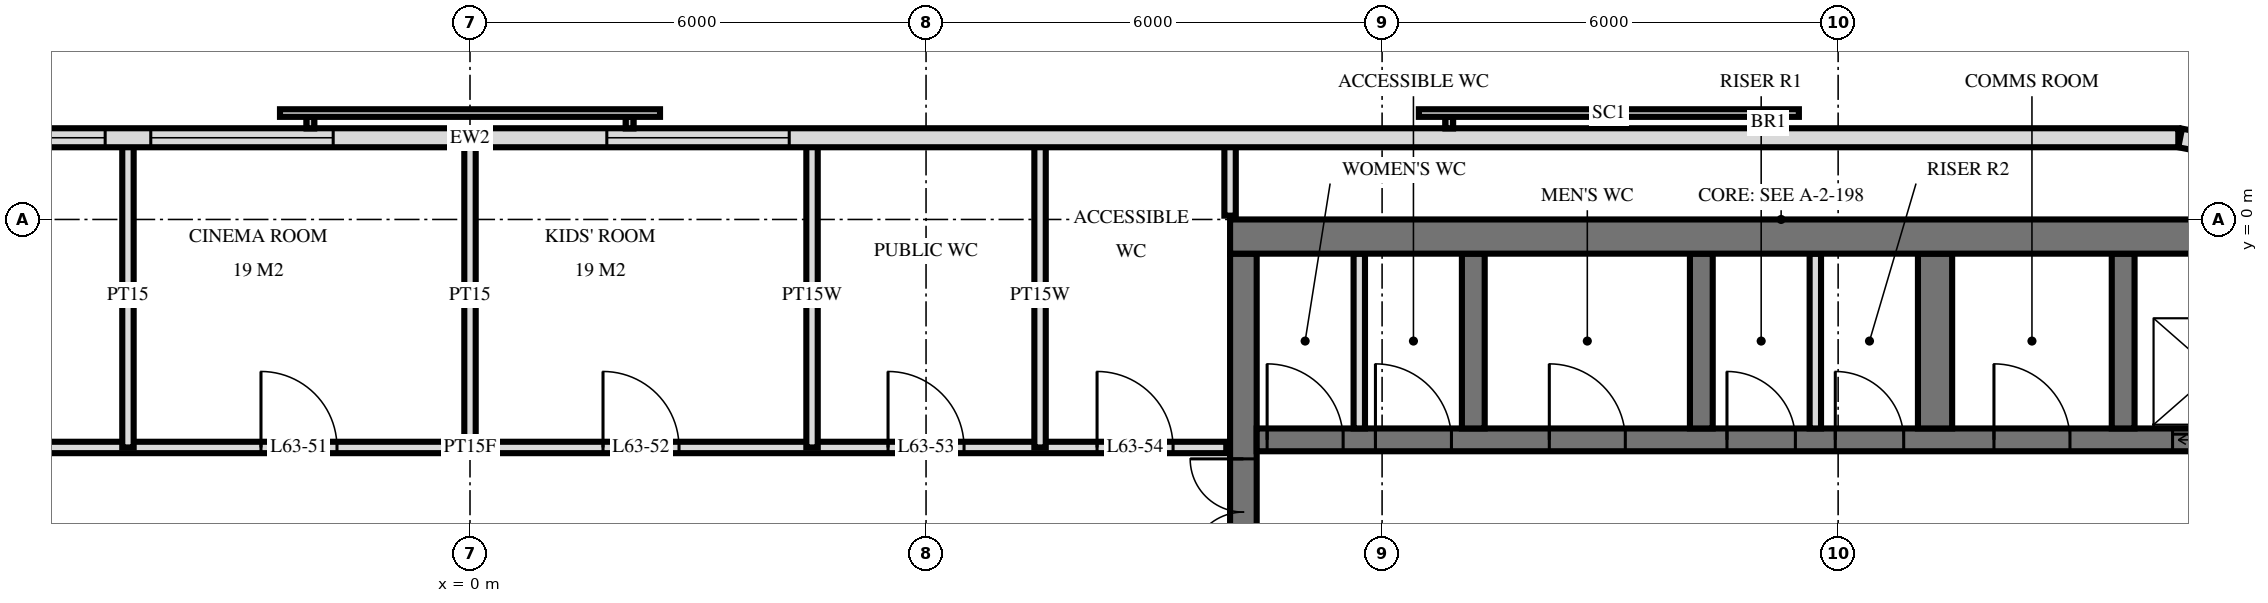
"""IFC4 building model, lengths in metres.
Left out: names, types, materials, properties, quantities, classifications, styles, units other than length and angle.
Written with IfcOpenShell. Run it as: python <this file> out.ifc"""

import sys

from ifc_helpers import new_model, si_unit, direction, frame, frame_2d, origin, place, context, subcontext, project, spatial, rectangle, extrude, element, fill, save


model = new_model("IFC4")
c1 = context("Model", 3, precision=1e-05, world=origin(), true_north=direction((0.0, 1.0)))
c2 = subcontext(c1, "Body", "Model", "MODEL_VIEW")
j1 = project(units=[si_unit("LENGTHUNIT", "METRE"), si_unit("PLANEANGLEUNIT", "RADIAN")], contexts=[c1])
p1 = place(None, origin())
s1 = spatial("IfcSite", under=j1, at=p1, CompositionType="ELEMENT")
p2 = place(p1, origin())
s2 = spatial("IfcBuilding", under=s1, at=p2, CompositionType="ELEMENT")
p3 = place(p2, frame((0.0, 0.0, 239.6)))
s3 = spatial("IfcBuildingStorey", under=s2, at=p3, CompositionType="ELEMENT", Elevation=239.6)
p4 = place(p3, frame((10.0, -0.225, 0.0), z_axis=(0.0, 0.0, 1.0), x_axis=(1.0, 0.0, 0.0)))
e1 = element("IfcWall", 1, at=p4, inside=s3, PredefinedType="SHEAR", context=c2, shape_type="SweptSolid", body=[
    extrude(rectangle(XDim=14.5, YDim=0.45, at=frame_2d((7.25, 0.0))), origin(), (0.0, 0.0, 1.0), 3.5),
])
p5 = place(p3, frame((10.175, -14.55, 0.0), z_axis=(0.0, 0.0, 1.0), x_axis=(0.0, 1.0, 0.0)))
e2 = element("IfcWall", 2, at=p5, inside=s3, PredefinedType="SHEAR", context=c2, shape_type="SweptSolid", body=[
    extrude(rectangle(XDim=14.1, YDim=0.35, at=frame_2d((7.05, 0.0))), origin(), (0.0, 0.0, 1.0), 3.5),
])
p6 = place(p5, frame((8.4, 0.0, 0.0)))
e3 = element("IfcOpeningElement", 3, at=p6, cuts=e2, PredefinedType="OPENING", context=c2, shape_type="SweptSolid", body=[
    extrude(rectangle(XDim=1.4, YDim=2.4, at=frame_2d((0.7, 1.2))), frame((0.0, 0.185, 0.0), z_axis=(0.0, -1.0, 0.0), x_axis=(1.0, 0.0, 0.0)), (0.0, 0.0, 1.0), 0.37),
])
p7 = place(p5, frame((10.0, 0.0, 0.0)))
e4 = element("IfcOpeningElement", 4, at=p7, cuts=e2, PredefinedType="OPENING", context=c2, shape_type="SweptSolid", body=[
    extrude(rectangle(XDim=1.4, YDim=2.4, at=frame_2d((0.7, 1.2))), frame((0.0, 0.185, 0.0), z_axis=(0.0, -1.0, 0.0), x_axis=(1.0, 0.0, 0.0)), (0.0, 0.0, 1.0), 0.37),
])
p8 = place(p5, frame((4.0, 0.0, 0.0)))
e5 = element("IfcOpeningElement", 5, at=p8, cuts=e2, PredefinedType="OPENING", context=c2, shape_type="SweptSolid", body=[
    extrude(rectangle(XDim=1.2, YDim=2.1, at=frame_2d((0.6, 1.05))), frame((0.0, 0.185, 0.0), z_axis=(0.0, -1.0, 0.0), x_axis=(1.0, 0.0, 0.0)), (0.0, 0.0, 1.0), 0.37),
])
p9 = place(p3, frame((10.35, -2.9, 0.0), z_axis=(0.0, 0.0, 1.0), x_axis=(1.0, 0.0, 0.0)))
e6 = element("IfcWall", 6, at=p9, inside=s3, PredefinedType="SHEAR", context=c2, shape_type="SweptSolid", body=[
    extrude(rectangle(XDim=13.7, YDim=0.3, at=frame_2d((6.85, 0.0))), origin(), (0.0, 0.0, 1.0), 3.5),
])
p10 = place(p9, frame((12.05, 0.0, 0.0)))
e7 = element("IfcOpeningElement", 7, at=p10, cuts=e6, PredefinedType="OPENING", context=c2, shape_type="SweptSolid", body=[
    extrude(rectangle(XDim=1.1, YDim=2.1, at=frame_2d((0.55, 1.05))), frame((0.0, 0.16, 0.0), z_axis=(0.0, -1.0, 0.0), x_axis=(1.0, 0.0, 0.0)), (0.0, 0.0, 1.0), 0.32),
])
p11 = place(p9, frame((6.188, 0.0, 0.0)))
e8 = element("IfcOpeningElement", 8, at=p11, cuts=e6, PredefinedType="OPENING", context=c2, shape_type="SweptSolid", body=[
    extrude(rectangle(XDim=0.9, YDim=2.1, at=frame_2d((0.45, 1.05))), frame((0.0, 0.16, 0.0), z_axis=(0.0, -1.0, 0.0), x_axis=(1.0, 0.0, 0.0)), (0.0, 0.0, 1.0), 0.32),
])
p12 = place(p9, frame((7.613, 0.0, 0.0)))
e9 = element("IfcOpeningElement", 9, at=p12, cuts=e6, PredefinedType="OPENING", context=c2, shape_type="SweptSolid", body=[
    extrude(rectangle(XDim=0.9, YDim=2.1, at=frame_2d((0.45, 1.05))), frame((0.0, 0.16, 0.0), z_axis=(0.0, -1.0, 0.0), x_axis=(1.0, 0.0, 0.0)), (0.0, 0.0, 1.0), 0.32),
])
p13 = place(p9, frame((0.137, 0.0, 0.0)))
e10 = element("IfcOpeningElement", 10, at=p13, cuts=e6, PredefinedType="OPENING", context=c2, shape_type="SweptSolid", body=[
    extrude(rectangle(XDim=1.0, YDim=2.1, at=frame_2d((0.5, 1.05))), frame((0.0, 0.16, 0.0), z_axis=(0.0, -1.0, 0.0), x_axis=(1.0, 0.0, 0.0)), (0.0, 0.0, 1.0), 0.32),
])
p14 = place(p9, frame((1.562, 0.0, 0.0)))
e11 = element("IfcOpeningElement", 11, at=p14, cuts=e6, PredefinedType="OPENING", context=c2, shape_type="SweptSolid", body=[
    extrude(rectangle(XDim=1.0, YDim=2.1, at=frame_2d((0.5, 1.05))), frame((0.0, 0.16, 0.0), z_axis=(0.0, -1.0, 0.0), x_axis=(1.0, 0.0, 0.0)), (0.0, 0.0, 1.0), 0.32),
])
p15 = place(p9, frame((3.85, 0.0, 0.0)))
e12 = element("IfcOpeningElement", 12, at=p15, cuts=e6, PredefinedType="OPENING", context=c2, shape_type="SweptSolid", body=[
    extrude(rectangle(XDim=1.0, YDim=2.1, at=frame_2d((0.5, 1.05))), frame((0.0, 0.16, 0.0), z_axis=(0.0, -1.0, 0.0), x_axis=(1.0, 0.0, 0.0)), (0.0, 0.0, 1.0), 0.32),
])
p16 = place(p9, frame((9.7, 0.0, 0.0)))
e13 = element("IfcOpeningElement", 13, at=p16, cuts=e6, PredefinedType="OPENING", context=c2, shape_type="SweptSolid", body=[
    extrude(rectangle(XDim=1.0, YDim=2.1, at=frame_2d((0.5, 1.05))), frame((0.0, 0.16, 0.0), z_axis=(0.0, -1.0, 0.0), x_axis=(1.0, 0.0, 0.0)), (0.0, 0.0, 1.0), 0.32),
])
for number, where, z_axis, x_axis in (
    (14, (13.2, -2.75, 0.0), (0.0, 0.0, 1.0), (0.0, 1.0, 0.0)),
    (15, (16.2, -2.75, 0.0), (0.0, 0.0, 1.0), (0.0, 1.0, 0.0)),
):
    element("IfcWall", number, at=place(p3, frame(where, z_axis=z_axis, x_axis=x_axis)), inside=s3, PredefinedType="SHEAR", context=c2, shape_type="SweptSolid", body=[
        extrude(rectangle(XDim=2.3, YDim=0.3, at=frame_2d((1.15, 0.0))), origin(), (0.0, 0.0, 1.0), 3.5),
    ])
p17 = place(p3, frame((19.275, -2.75, 0.0), z_axis=(0.0, 0.0, 1.0), x_axis=(0.0, 1.0, 0.0)))
e16 = element("IfcWall", 16, at=p17, inside=s3, PredefinedType="SHEAR", context=c2, shape_type="SweptSolid", body=[
    extrude(rectangle(XDim=2.3, YDim=0.45, at=frame_2d((1.15, 0.0))), origin(), (0.0, 0.0, 1.0), 3.5),
])
p18 = place(p3, frame((21.75, -2.75, 0.0), z_axis=(0.0, 0.0, 1.0), x_axis=(0.0, 1.0, 0.0)))
e17 = element("IfcWall", 17, at=p18, inside=s3, PredefinedType="SHEAR", context=c2, shape_type="SweptSolid", body=[
    extrude(rectangle(XDim=2.3, YDim=0.3, at=frame_2d((1.15, 0.0))), origin(), (0.0, 0.0, 1.0), 3.5),
])
p19 = place(p3, frame((24.149, 0.745, 0.0), z_axis=(0.0, 0.0, 1.0), x_axis=(-0.980803419081, 0.194999110559, 0.0)))
e18 = element("IfcWall", 18, at=p19, inside=s3, PredefinedType="SOLIDWALL", context=c2, shape_type="SweptSolid", body=[
    extrude(rectangle(XDim=1.681, YDim=0.25, at=frame_2d((0.841, 0.0))), origin(), (0.0, 0.0, 1.0), 3.22),
])
p20 = place(p3, frame((22.475, 1.075, 0.0), z_axis=(0.0, 0.0, 1.0), x_axis=(-1.0, 0.0, 0.0)))
e19 = element("IfcWall", 19, at=p20, inside=s3, PredefinedType="SOLIDWALL", context=c2, shape_type="SweptSolid", body=[
    extrude(rectangle(XDim=44.951, YDim=0.25, at=frame_2d((22.475, 0.0))), origin(), (0.0, 0.0, 1.0), 3.22),
])
p21 = place(p20, frame((18.275, 0.0, 0.9)))
e20 = element("IfcOpeningElement", 20, at=p21, cuts=e19, PredefinedType="OPENING", context=c2, shape_type="SweptSolid", body=[
    extrude(rectangle(XDim=2.4, YDim=1.5, at=frame_2d((1.2, 0.75))), frame((0.0, 0.135, 0.0), z_axis=(0.0, -1.0, 0.0), x_axis=(1.0, 0.0, 0.0)), (0.0, 0.0, 1.0), 0.27),
])
p22 = place(p20, frame((24.275, 0.0, 0.9)))
e21 = element("IfcOpeningElement", 21, at=p22, cuts=e19, PredefinedType="OPENING", context=c2, shape_type="SweptSolid", body=[
    extrude(rectangle(XDim=2.4, YDim=1.5, at=frame_2d((1.2, 0.75))), frame((0.0, 0.135, 0.0), z_axis=(0.0, -1.0, 0.0), x_axis=(1.0, 0.0, 0.0)), (0.0, 0.0, 1.0), 0.27),
])
p23 = place(p20, frame((27.275, 0.0, 0.9)))
e22 = element("IfcOpeningElement", 22, at=p23, cuts=e19, PredefinedType="OPENING", context=c2, shape_type="SweptSolid", body=[
    extrude(rectangle(XDim=2.4, YDim=1.5, at=frame_2d((1.2, 0.75))), frame((0.0, 0.135, 0.0), z_axis=(0.0, -1.0, 0.0), x_axis=(1.0, 0.0, 0.0)), (0.0, 0.0, 1.0), 0.27),
])
for number, where, z_axis, x_axis in (
    (23, (17.7, -2.75, 0.0), (0.0, 0.0, 1.0), (0.0, 1.0, 0.0)),
    (24, (11.7, -2.75, 0.0), (0.0, 0.0, 1.0), (0.0, 1.0, 0.0)),
):
    element("IfcWall", number, at=place(p3, frame(where, z_axis=z_axis, x_axis=x_axis)), inside=s3, PredefinedType="PARTITIONING", context=c2, shape_type="SweptSolid", body=[
        extrude(rectangle(XDim=2.3, YDim=0.15, at=frame_2d((1.15, 0.0))), origin(), (0.0, 0.0, 1.0), 3.2),
    ])
p24 = place(p3, frame((10.0, 0.05, 0.0), z_axis=(0.0, 0.0, 1.0), x_axis=(0.0, 1.0, 0.0)))
e25 = element("IfcWall", 25, at=p24, inside=s3, PredefinedType="PLUMBINGWALL", context=c2, shape_type="SweptSolid", body=[
    extrude(rectangle(XDim=0.97, YDim=0.15, at=frame_2d((0.485, 0.0))), origin(), (0.0, 0.0, 1.0), 3.22),
])
for number, where, z_axis, x_axis in (
    (26, (7.5, -3.0, 0.0), (0.0, 0.0, 1.0), (0.0, 1.0, 0.0)),
    (27, (4.5, -3.0, 0.0), (0.0, 0.0, 1.0), (0.0, 1.0, 0.0)),
):
    element("IfcWall", number, at=place(p3, frame(where, z_axis=z_axis, x_axis=x_axis)), inside=s3, PredefinedType="PLUMBINGWALL", context=c2, shape_type="SweptSolid", body=[
        extrude(rectangle(XDim=4.02, YDim=0.15, at=frame_2d((2.01, 0.0))), origin(), (0.0, 0.0, 1.0), 3.22),
    ])
for number, where, z_axis, x_axis in (
    (28, (0.0, -3.0, 0.0), (0.0, 0.0, 1.0), (0.0, 1.0, 0.0)),
    (29, (-4.5, -3.0, 0.0), (0.0, 0.0, 1.0), (0.0, 1.0, 0.0)),
):
    element("IfcWall", number, at=place(p3, frame(where, z_axis=z_axis, x_axis=x_axis)), inside=s3, PredefinedType="PARTITIONING", context=c2, shape_type="SweptSolid", body=[
        extrude(rectangle(XDim=4.02, YDim=0.15, at=frame_2d((2.01, 0.0))), origin(), (0.0, 0.0, 1.0), 3.22),
    ])
p25 = place(p3, frame((-9.95, -3.0, 0.0), z_axis=(0.0, 0.0, 1.0), x_axis=(1.0, 0.0, 0.0)))
e30 = element("IfcWall", 30, at=p25, inside=s3, PredefinedType="PARTITIONING", context=c2, shape_type="SweptSolid", body=[
    extrude(rectangle(XDim=19.9, YDim=0.15, at=frame_2d((9.95, 0.0))), origin(), (0.0, 0.0, 1.0), 3.22),
])
p26 = place(p25, frame((2.2, 0.0, 0.0)))
e31 = element("IfcOpeningElement", 31, at=p26, cuts=e30, PredefinedType="OPENING", context=c2, shape_type="SweptSolid", body=[
    extrude(rectangle(XDim=1.0, YDim=2.1, at=frame_2d((0.5, 1.05))), frame((0.0, 0.085, 0.0), z_axis=(0.0, -1.0, 0.0), x_axis=(1.0, 0.0, 0.0)), (0.0, 0.0, 1.0), 0.17),
])
p27 = place(p25, frame((7.2, 0.0, 0.0)))
e32 = element("IfcOpeningElement", 32, at=p27, cuts=e30, PredefinedType="OPENING", context=c2, shape_type="SweptSolid", body=[
    extrude(rectangle(XDim=1.0, YDim=2.1, at=frame_2d((0.5, 1.05))), frame((0.0, 0.085, 0.0), z_axis=(0.0, -1.0, 0.0), x_axis=(1.0, 0.0, 0.0)), (0.0, 0.0, 1.0), 0.17),
])
p28 = place(p25, frame((11.7, 0.0, 0.0)))
e33 = element("IfcOpeningElement", 33, at=p28, cuts=e30, PredefinedType="OPENING", context=c2, shape_type="SweptSolid", body=[
    extrude(rectangle(XDim=1.0, YDim=2.1, at=frame_2d((0.5, 1.05))), frame((0.0, 0.085, 0.0), z_axis=(0.0, -1.0, 0.0), x_axis=(1.0, 0.0, 0.0)), (0.0, 0.0, 1.0), 0.17),
])
p29 = place(p25, frame((15.45, 0.0, 0.0)))
e34 = element("IfcOpeningElement", 34, at=p29, cuts=e30, PredefinedType="OPENING", context=c2, shape_type="SweptSolid", body=[
    extrude(rectangle(XDim=1.0, YDim=2.1, at=frame_2d((0.5, 1.05))), frame((0.0, 0.085, 0.0), z_axis=(0.0, -1.0, 0.0), x_axis=(1.0, 0.0, 0.0)), (0.0, 0.0, 1.0), 0.17),
])
p30 = place(p25, frame((18.2, 0.0, 0.0)))
e35 = element("IfcOpeningElement", 35, at=p30, cuts=e30, PredefinedType="OPENING", context=c2, shape_type="SweptSolid", body=[
    extrude(rectangle(XDim=1.0, YDim=2.1, at=frame_2d((0.5, 1.05))), frame((0.0, 0.085, 0.0), z_axis=(0.0, -1.0, 0.0), x_axis=(1.0, 0.0, 0.0)), (0.0, 0.0, 1.0), 0.17),
])
p31 = place(p21, origin())
e36 = element("IfcWindow", 36, at=p31, inside=s3, PartitioningType="SINGLE_PANEL", PredefinedType="WINDOW", context=c2, shape_type="SweptSolid", body=[
    extrude(rectangle(XDim=2.4, YDim=1.5, at=frame_2d((1.2, 0.75))), frame((0.0, 0.03, 0.0), z_axis=(0.0, -1.0, 0.0), x_axis=(1.0, 0.0, 0.0)), (0.0, 0.0, 1.0), 0.06),
])
fill(e20, e36)
p32 = place(p22, origin())
e37 = element("IfcWindow", 37, at=p32, inside=s3, PartitioningType="SINGLE_PANEL", PredefinedType="WINDOW", context=c2, shape_type="SweptSolid", body=[
    extrude(rectangle(XDim=2.4, YDim=1.5, at=frame_2d((1.2, 0.75))), frame((0.0, 0.03, 0.0), z_axis=(0.0, -1.0, 0.0), x_axis=(1.0, 0.0, 0.0)), (0.0, 0.0, 1.0), 0.06),
])
fill(e21, e37)
p33 = place(p23, origin())
e38 = element("IfcWindow", 38, at=p33, inside=s3, PartitioningType="SINGLE_PANEL", PredefinedType="WINDOW", context=c2, shape_type="SweptSolid", body=[
    extrude(rectangle(XDim=2.4, YDim=1.5, at=frame_2d((1.2, 0.75))), frame((0.0, 0.03, 0.0), z_axis=(0.0, -1.0, 0.0), x_axis=(1.0, 0.0, 0.0)), (0.0, 0.0, 1.0), 0.06),
])
fill(e22, e38)
p34 = place(p10, origin())
e39 = element("IfcDoor", 39, at=p34, inside=s3, OperationType="DOUBLE_DOOR_SLIDING", PredefinedType="USERDEFINED", context=c2, shape_type="SweptSolid", body=[
    extrude(rectangle(XDim=1.1, YDim=2.1, at=frame_2d((0.55, 1.05))), frame((0.0, 0.025, 0.0), z_axis=(0.0, -1.0, 0.0), x_axis=(1.0, 0.0, 0.0)), (0.0, 0.0, 1.0), 0.05),
])
fill(e7, e39)
p35 = place(p7, origin())
e40 = element("IfcDoor", 40, at=p35, inside=s3, OperationType="DOUBLE_DOOR_SINGLE_SWING", PredefinedType="DOOR", context=c2, shape_type="SweptSolid", body=[
    extrude(rectangle(XDim=1.4, YDim=2.4, at=frame_2d((0.7, 1.2))), frame((0.0, 0.025, 0.0), z_axis=(0.0, -1.0, 0.0), x_axis=(1.0, 0.0, 0.0)), (0.0, 0.0, 1.0), 0.05),
])
fill(e4, e40)
p36 = place(p11, origin())
e41 = element("IfcDoor", 41, at=p36, inside=s3, OperationType="SINGLE_SWING_RIGHT", PredefinedType="DOOR", context=c2, shape_type="SweptSolid", body=[
    extrude(rectangle(XDim=0.9, YDim=2.1, at=frame_2d((0.45, 1.05))), frame((0.0, 0.025, 0.0), z_axis=(0.0, -1.0, 0.0), x_axis=(1.0, 0.0, 0.0)), (0.0, 0.0, 1.0), 0.05),
])
fill(e8, e41)
p37 = place(p12, origin())
e42 = element("IfcDoor", 42, at=p37, inside=s3, OperationType="SINGLE_SWING_RIGHT", PredefinedType="DOOR", context=c2, shape_type="SweptSolid", body=[
    extrude(rectangle(XDim=0.9, YDim=2.1, at=frame_2d((0.45, 1.05))), frame((0.0, 0.025, 0.0), z_axis=(0.0, -1.0, 0.0), x_axis=(1.0, 0.0, 0.0)), (0.0, 0.0, 1.0), 0.05),
])
fill(e9, e42)
p38 = place(p13, origin())
e43 = element("IfcDoor", 43, at=p38, inside=s3, OperationType="SINGLE_SWING_RIGHT", PredefinedType="DOOR", context=c2, shape_type="SweptSolid", body=[
    extrude(rectangle(XDim=1.0, YDim=2.1, at=frame_2d((0.5, 1.05))), frame((0.0, 0.025, 0.0), z_axis=(0.0, -1.0, 0.0), x_axis=(1.0, 0.0, 0.0)), (0.0, 0.0, 1.0), 0.05),
])
fill(e10, e43)
p39 = place(p14, origin())
e44 = element("IfcDoor", 44, at=p39, inside=s3, OperationType="SINGLE_SWING_RIGHT", PredefinedType="DOOR", context=c2, shape_type="SweptSolid", body=[
    extrude(rectangle(XDim=1.0, YDim=2.1, at=frame_2d((0.5, 1.05))), frame((0.0, 0.025, 0.0), z_axis=(0.0, -1.0, 0.0), x_axis=(1.0, 0.0, 0.0)), (0.0, 0.0, 1.0), 0.05),
])
fill(e11, e44)
p40 = place(p15, origin())
e45 = element("IfcDoor", 45, at=p40, inside=s3, OperationType="SINGLE_SWING_RIGHT", PredefinedType="DOOR", context=c2, shape_type="SweptSolid", body=[
    extrude(rectangle(XDim=1.0, YDim=2.1, at=frame_2d((0.5, 1.05))), frame((0.0, 0.025, 0.0), z_axis=(0.0, -1.0, 0.0), x_axis=(1.0, 0.0, 0.0)), (0.0, 0.0, 1.0), 0.05),
])
fill(e12, e45)
p41 = place(p16, origin())
e46 = element("IfcDoor", 46, at=p41, inside=s3, OperationType="SINGLE_SWING_RIGHT", PredefinedType="DOOR", context=c2, shape_type="SweptSolid", body=[
    extrude(rectangle(XDim=1.0, YDim=2.1, at=frame_2d((0.5, 1.05))), frame((0.0, 0.025, 0.0), z_axis=(0.0, -1.0, 0.0), x_axis=(1.0, 0.0, 0.0)), (0.0, 0.0, 1.0), 0.05),
])
fill(e13, e46)
p42 = place(p27, origin())
e47 = element("IfcDoor", 47, at=p42, inside=s3, OperationType="SINGLE_SWING_RIGHT", PredefinedType="DOOR", context=c2, shape_type="SweptSolid", body=[
    extrude(rectangle(XDim=1.0, YDim=2.1, at=frame_2d((0.5, 1.05))), frame((0.0, 0.025, 0.0), z_axis=(0.0, -1.0, 0.0), x_axis=(1.0, 0.0, 0.0)), (0.0, 0.0, 1.0), 0.05),
])
fill(e32, e47)
p43 = place(p28, origin())
e48 = element("IfcDoor", 48, at=p43, inside=s3, OperationType="SINGLE_SWING_RIGHT", PredefinedType="DOOR", context=c2, shape_type="SweptSolid", body=[
    extrude(rectangle(XDim=1.0, YDim=2.1, at=frame_2d((0.5, 1.05))), frame((0.0, 0.025, 0.0), z_axis=(0.0, -1.0, 0.0), x_axis=(1.0, 0.0, 0.0)), (0.0, 0.0, 1.0), 0.05),
])
fill(e33, e48)
p44 = place(p29, origin())
e49 = element("IfcDoor", 49, at=p44, inside=s3, OperationType="SINGLE_SWING_RIGHT", PredefinedType="DOOR", context=c2, shape_type="SweptSolid", body=[
    extrude(rectangle(XDim=1.0, YDim=2.1, at=frame_2d((0.5, 1.05))), frame((0.0, 0.025, 0.0), z_axis=(0.0, -1.0, 0.0), x_axis=(1.0, 0.0, 0.0)), (0.0, 0.0, 1.0), 0.05),
])
fill(e34, e49)
p45 = place(p30, origin())
e50 = element("IfcDoor", 50, at=p45, inside=s3, OperationType="SINGLE_SWING_RIGHT", PredefinedType="DOOR", context=c2, shape_type="SweptSolid", body=[
    extrude(rectangle(XDim=1.0, YDim=2.1, at=frame_2d((0.5, 1.05))), frame((0.0, 0.025, 0.0), z_axis=(0.0, -1.0, 0.0), x_axis=(1.0, 0.0, 0.0)), (0.0, 0.0, 1.0), 0.05),
])
fill(e35, e50)
save(model, sys.argv[1])
